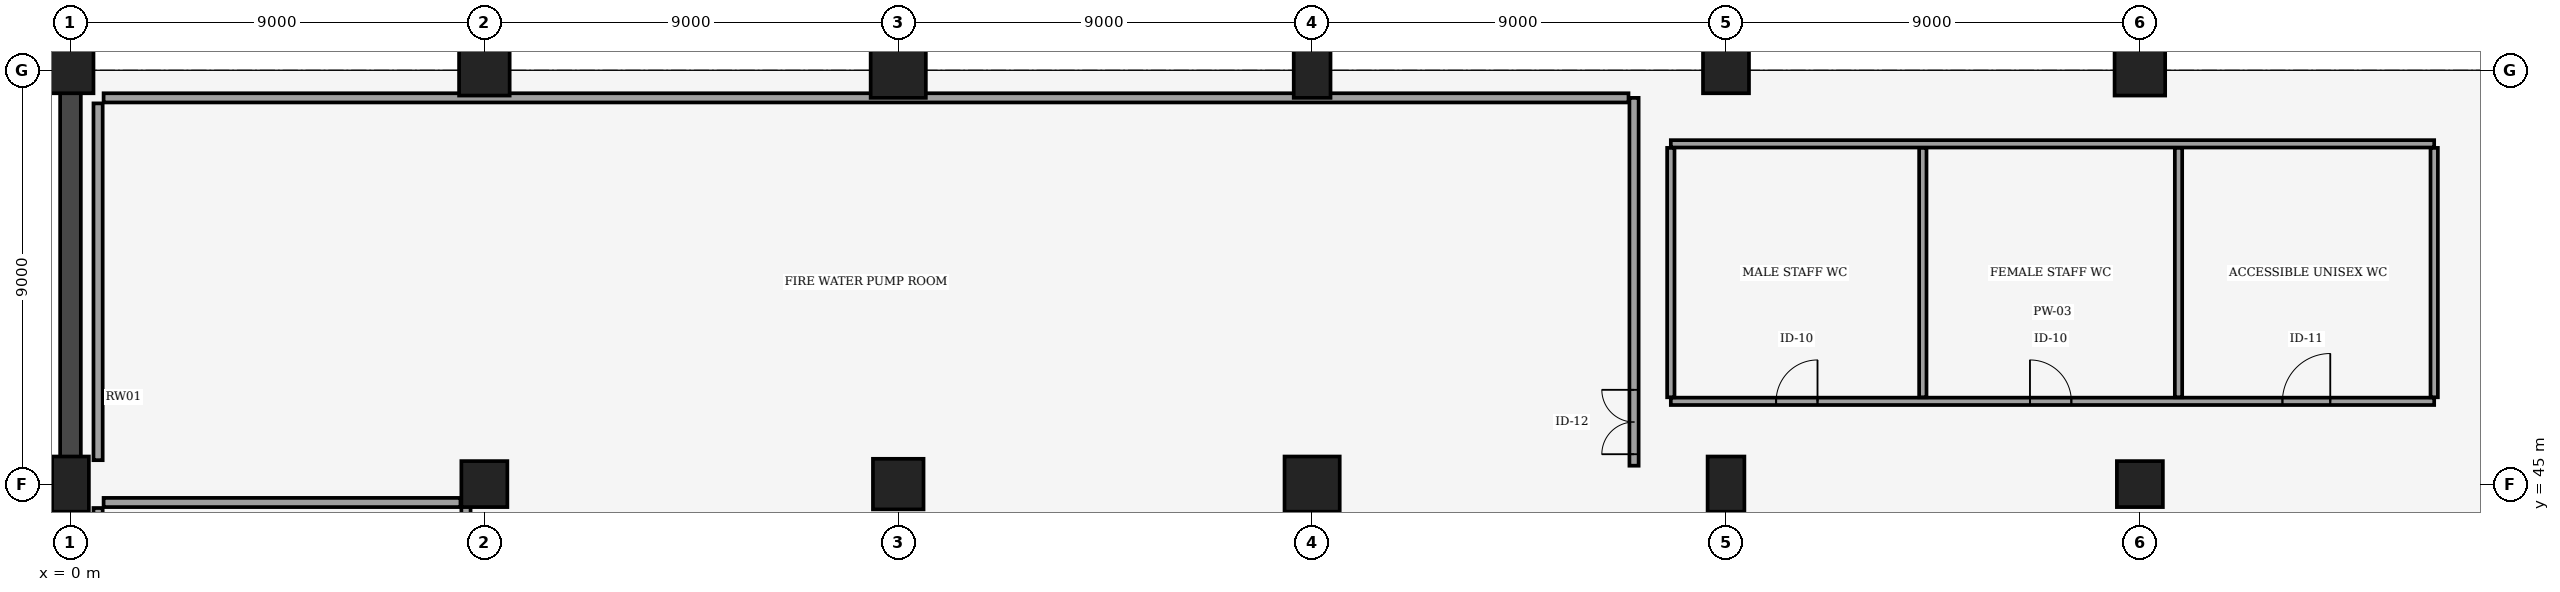
"""IFC4 building model, lengths in metres.
Left out: names, types, materials, properties, quantities, classifications, styles, units other than length and angle.
Written with IfcOpenShell. Run it as: python <this file> out.ifc"""

import sys

from ifc_helpers import new_model, si_unit, direction, frame, frame_2d, origin, origin_2d, place, context, subcontext, project, spatial, rectangle, extrude, element, fill, save


model = new_model("IFC4")
c1 = context("Model", 3, precision=1e-05, world=origin(), true_north=direction((0.0, 1.0)))
c2 = subcontext(c1, "Body", "Model", "MODEL_VIEW")
j1 = project(units=[si_unit("LENGTHUNIT", "METRE"), si_unit("PLANEANGLEUNIT", "RADIAN")], contexts=[c1])
p1 = place(None, origin())
s1 = spatial("IfcSite", under=j1, at=p1, CompositionType="ELEMENT")
p2 = place(p1, origin())
s2 = spatial("IfcBuilding", under=s1, at=p2, CompositionType="ELEMENT")
p3 = place(p2, frame((0.0, 0.0, -5.0)))
s3 = spatial("IfcBuildingStorey", under=s2, at=p3, CompositionType="ELEMENT", Elevation=-5.0)
p4 = place(p3, frame((0.0, 45.0, 0.0), z_axis=(0.0, 0.0, 1.0), x_axis=(1.0, 0.0, 0.0)))
e1 = element("IfcColumn", 1, at=p4, inside=s3, PredefinedType="COLUMN", context=c2, shape_type="SweptSolid", body=[
    extrude(rectangle(XDim=0.8, YDim=1.2, at=origin_2d()), origin(), (0.0, 0.0, 1.0), 5.0),
])
for number, where, z_axis, x_axis in (
    (2, (0.0, 54.0, 0.0), (0.0, 0.0, 1.0), (1.0, 0.0, 0.0)),
    (3, (9.0, 45.0, 0.0), (0.0, 0.0, 1.0), (1.0, 0.0, 0.0)),
):
    element("IfcColumn", number, at=place(p3, frame(where, z_axis=z_axis, x_axis=x_axis)), inside=s3, PredefinedType="COLUMN", context=c2, shape_type="SweptSolid", body=[
        extrude(rectangle(XDim=1.0, YDim=1.0, at=origin_2d()), origin(), (0.0, 0.0, 1.0), 5.0),
    ])
for number, where, z_axis, x_axis in (
    (4, (9.0, 54.0, 0.0), (0.0, 0.0, 1.0), (1.0, 0.0, 0.0)),
    (5, (18.0, 45.0, 0.0), (0.0, 0.0, 1.0), (1.0, 0.0, 0.0)),
):
    element("IfcColumn", number, at=place(p3, frame(where, z_axis=z_axis, x_axis=x_axis)), inside=s3, PredefinedType="COLUMN", context=c2, shape_type="SweptSolid", body=[
        extrude(rectangle(XDim=1.1, YDim=1.1, at=origin_2d()), origin(), (0.0, 0.0, 1.0), 5.0),
    ])
for number, where, z_axis, x_axis in (
    (6, (18.0, 54.0, 0.0), (0.0, 0.0, 1.0), (1.0, 0.0, 0.0)),
    (7, (27.0, 45.0, 0.0), (0.0, 0.0, 1.0), (1.0, 0.0, 0.0)),
):
    element("IfcColumn", number, at=place(p3, frame(where, z_axis=z_axis, x_axis=x_axis)), inside=s3, PredefinedType="COLUMN", context=c2, shape_type="SweptSolid", body=[
        extrude(rectangle(XDim=1.2, YDim=1.2, at=origin_2d()), origin(), (0.0, 0.0, 1.0), 5.0),
    ])
for number, where, z_axis, x_axis in (
    (8, (27.0, 54.0, 0.0), (0.0, 0.0, 1.0), (1.0, 0.0, 0.0)),
    (9, (36.0, 45.0, 0.0), (0.0, 0.0, 1.0), (1.0, 0.0, 0.0)),
):
    element("IfcColumn", number, at=place(p3, frame(where, z_axis=z_axis, x_axis=x_axis)), inside=s3, PredefinedType="COLUMN", context=c2, shape_type="SweptSolid", body=[
        extrude(rectangle(XDim=0.8, YDim=1.2, at=origin_2d()), origin(), (0.0, 0.0, 1.0), 5.0),
    ])
for number, where, z_axis, x_axis in (
    (10, (36.0, 54.0, 0.0), (0.0, 0.0, 1.0), (1.0, 0.0, 0.0)),
    (11, (45.0, 45.0, 0.0), (0.0, 0.0, 1.0), (1.0, 0.0, 0.0)),
):
    element("IfcColumn", number, at=place(p3, frame(where, z_axis=z_axis, x_axis=x_axis)), inside=s3, PredefinedType="COLUMN", context=c2, shape_type="SweptSolid", body=[
        extrude(rectangle(XDim=1.0, YDim=1.0, at=origin_2d()), origin(), (0.0, 0.0, 1.0), 5.0),
    ])
p5 = place(p3, frame((45.0, 54.0, 0.0), z_axis=(0.0, 0.0, 1.0), x_axis=(1.0, 0.0, 0.0)))
e12 = element("IfcColumn", 12, at=p5, inside=s3, PredefinedType="COLUMN", context=c2, shape_type="SweptSolid", body=[
    extrude(rectangle(XDim=1.1, YDim=1.1, at=origin_2d()), origin(), (0.0, 0.0, 1.0), 5.0),
])
p6 = place(p3, frame((0.0, 0.595, 0.0), z_axis=(0.0, 0.0, 1.0), x_axis=(0.0, 1.0, 0.0)))
e13 = element("IfcWall", 13, at=p6, inside=s3, PredefinedType="SHEAR", context=c2, shape_type="SweptSolid", body=[
    extrude(rectangle(XDim=52.91, YDim=0.45, at=frame_2d((26.455, 0.0))), origin(), (0.0, 0.0, 1.0), 3.95),
])
p7 = place(p3, frame((34.8, 46.8, 0.0), z_axis=(0.0, 0.0, 1.0), x_axis=(1.0, 0.0, 0.0)))
e14 = element("IfcWall", 14, at=p7, inside=s3, PredefinedType="PLUMBINGWALL", context=c2, shape_type="SweptSolid", body=[
    extrude(rectangle(XDim=16.6, YDim=0.16, at=frame_2d((8.3, 0.0))), origin(), (0.0, 0.0, 1.0), 3.85),
])
p8 = place(p7, frame((2.29, 0.0, 0.0)))
e15 = element("IfcOpeningElement", 15, at=p8, cuts=e14, PredefinedType="OPENING", context=c2, shape_type="SweptSolid", body=[
    extrude(rectangle(XDim=0.9, YDim=2.1, at=frame_2d((0.45, 1.05))), frame((0.0, 0.09, 0.0), z_axis=(0.0, -1.0, 0.0), x_axis=(1.0, 0.0, 0.0)), (0.0, 0.0, 1.0), 0.18),
])
p9 = place(p7, frame((7.81, 0.0, 0.0)))
e16 = element("IfcOpeningElement", 16, at=p9, cuts=e14, PredefinedType="OPENING", context=c2, shape_type="SweptSolid", body=[
    extrude(rectangle(XDim=0.9, YDim=2.1, at=frame_2d((0.45, 1.05))), frame((0.0, 0.09, 0.0), z_axis=(0.0, -1.0, 0.0), x_axis=(1.0, 0.0, 0.0)), (0.0, 0.0, 1.0), 0.18),
])
p10 = place(p7, frame((13.3, 0.0, 0.0)))
e17 = element("IfcOpeningElement", 17, at=p10, cuts=e14, PredefinedType="OPENING", context=c2, shape_type="SweptSolid", body=[
    extrude(rectangle(XDim=1.04, YDim=2.15, at=frame_2d((0.52, 1.075))), frame((0.0, 0.09, 0.0), z_axis=(0.0, -1.0, 0.0), x_axis=(1.0, 0.0, 0.0)), (0.0, 0.0, 1.0), 0.18),
])
p11 = place(p3, frame((34.8, 52.4, 0.0), z_axis=(0.0, 0.0, 1.0), x_axis=(1.0, 0.0, 0.0)))
e18 = element("IfcWall", 18, at=p11, inside=s3, PredefinedType="PLUMBINGWALL", context=c2, shape_type="SweptSolid", body=[
    extrude(rectangle(XDim=16.6, YDim=0.16, at=frame_2d((8.3, 0.0))), origin(), (0.0, 0.0, 1.0), 3.85),
])
for number, where, z_axis, x_axis in (
    (19, (34.8, 46.888, 0.0), (0.0, 0.0, 1.0), (0.0, 1.0, 0.0)),
    (20, (40.28, 46.888, 0.0), (0.0, 0.0, 1.0), (0.0, 1.0, 0.0)),
    (21, (45.84, 46.888, 0.0), (0.0, 0.0, 1.0), (0.0, 1.0, 0.0)),
    (22, (51.4, 46.888, 0.0), (0.0, 0.0, 1.0), (0.0, 1.0, 0.0)),
):
    element("IfcWall", number, at=place(p3, frame(where, z_axis=z_axis, x_axis=x_axis)), inside=s3, PredefinedType="PLUMBINGWALL", context=c2, shape_type="SweptSolid", body=[
        extrude(rectangle(XDim=5.424, YDim=0.16, at=frame_2d((2.712, 0.0))), origin(), (0.0, 0.0, 1.0), 3.85),
    ])
p12 = place(p3, frame((8.6, 27.14, 0.0), z_axis=(0.0, 0.0, 1.0), x_axis=(0.0, 1.0, 0.0)))
e23 = element("IfcWall", 23, at=p12, inside=s3, PredefinedType="SOLIDWALL", context=c2, shape_type="SweptSolid", body=[
    extrude(rectangle(XDim=17.46, YDim=0.2, at=frame_2d((8.73, 0.0))), origin(), (0.0, 0.0, 1.0), 3.85),
])
p13 = place(p12, frame((1.15, 0.0, 0.0)))
e24 = element("IfcOpeningElement", 24, at=p13, cuts=e23, PredefinedType="OPENING", context=c2, shape_type="SweptSolid", body=[
    extrude(rectangle(XDim=1.05, YDim=2.15, at=frame_2d((0.525, 1.075))), frame((0.0, 0.11, 0.0), z_axis=(0.0, -1.0, 0.0), x_axis=(1.0, 0.0, 0.0)), (0.0, 0.0, 1.0), 0.22),
])
p14 = place(p3, frame((0.72, 44.6, 0.0), z_axis=(0.0, 0.0, 1.0), x_axis=(1.0, 0.0, 0.0)))
e25 = element("IfcWall", 25, at=p14, inside=s3, PredefinedType="SOLIDWALL", context=c2, shape_type="SweptSolid", body=[
    extrude(rectangle(XDim=7.76, YDim=0.2, at=frame_2d((3.88, 0.0))), origin(), (0.0, 0.0, 1.0), 3.85),
])
p15 = place(p3, frame((0.6, 27.26, 0.0), z_axis=(0.0, 0.0, 1.0), x_axis=(0.0, 1.0, 0.0)))
e26 = element("IfcWall", 26, at=p15, inside=s3, PredefinedType="SOLIDWALL", context=c2, shape_type="SweptSolid", body=[
    extrude(rectangle(XDim=17.22, YDim=0.2, at=frame_2d((8.61, 0.0))), origin(), (0.0, 0.0, 1.0), 3.85),
])
p16 = place(p3, frame((34.0, 45.4, 0.0), z_axis=(0.0, 0.0, 1.0), x_axis=(0.0, 1.0, 0.0)))
e27 = element("IfcWall", 27, at=p16, inside=s3, PredefinedType="SOLIDWALL", context=c2, shape_type="SweptSolid", body=[
    extrude(rectangle(XDim=8.0, YDim=0.2, at=frame_2d((4.0, 0.0))), origin(), (0.0, 0.0, 1.0), 3.85),
])
p17 = place(p16, frame((0.25, 0.0, 0.0)))
e28 = element("IfcOpeningElement", 28, at=p17, cuts=e27, PredefinedType="OPENING", context=c2, shape_type="SweptSolid", body=[
    extrude(rectangle(XDim=1.4, YDim=2.25, at=frame_2d((0.7, 1.125))), frame((0.0, 0.11, 0.0), z_axis=(0.0, -1.0, 0.0), x_axis=(1.0, 0.0, 0.0)), (0.0, 0.0, 1.0), 0.22),
])
p18 = place(p3, frame((0.72, 53.4, 0.0), z_axis=(0.0, 0.0, 1.0), x_axis=(1.0, 0.0, 0.0)))
e29 = element("IfcWall", 29, at=p18, inside=s3, PredefinedType="SOLIDWALL", context=c2, shape_type="SweptSolid", body=[
    extrude(rectangle(XDim=33.16, YDim=0.2, at=frame_2d((16.58, 0.0))), origin(), (0.0, 0.0, 1.0), 3.85),
])
p19 = place(p3, frame((0.6, 45.52, 0.0), z_axis=(0.0, 0.0, 1.0), x_axis=(0.0, 1.0, 0.0)))
e30 = element("IfcWall", 30, at=p19, inside=s3, PredefinedType="SOLIDWALL", context=c2, shape_type="SweptSolid", body=[
    extrude(rectangle(XDim=7.76, YDim=0.2, at=frame_2d((3.88, 0.0))), origin(), (0.0, 0.0, 1.0), 3.85),
])
p20 = place(p8, origin())
e31 = element("IfcDoor", 31, at=p20, inside=s3, OperationType="SINGLE_SWING_RIGHT", PredefinedType="DOOR", context=c2, shape_type="SweptSolid", body=[
    extrude(rectangle(XDim=0.9, YDim=2.1, at=frame_2d((0.45, 1.05))), frame((0.0, 0.025, 0.0), z_axis=(0.0, -1.0, 0.0), x_axis=(1.0, 0.0, 0.0)), (0.0, 0.0, 1.0), 0.05),
])
fill(e15, e31)
p21 = place(p9, origin())
e32 = element("IfcDoor", 32, at=p21, inside=s3, OperationType="SINGLE_SWING_LEFT", PredefinedType="DOOR", context=c2, shape_type="SweptSolid", body=[
    extrude(rectangle(XDim=0.9, YDim=2.1, at=frame_2d((0.45, 1.05))), frame((0.0, 0.025, 0.0), z_axis=(0.0, -1.0, 0.0), x_axis=(1.0, 0.0, 0.0)), (0.0, 0.0, 1.0), 0.05),
])
fill(e16, e32)
p22 = place(p10, origin())
e33 = element("IfcDoor", 33, at=p22, inside=s3, OperationType="SINGLE_SWING_RIGHT", PredefinedType="DOOR", context=c2, shape_type="SweptSolid", body=[
    extrude(rectangle(XDim=1.04, YDim=2.15, at=frame_2d((0.52, 1.075))), frame((0.0, 0.025, 0.0), z_axis=(0.0, -1.0, 0.0), x_axis=(1.0, 0.0, 0.0)), (0.0, 0.0, 1.0), 0.05),
])
fill(e17, e33)
p23 = place(p17, origin())
e34 = element("IfcDoor", 34, at=p23, inside=s3, OperationType="DOUBLE_DOOR_SINGLE_SWING", PredefinedType="DOOR", context=c2, shape_type="SweptSolid", body=[
    extrude(rectangle(XDim=1.4, YDim=2.25, at=frame_2d((0.7, 1.125))), frame((0.0, 0.025, 0.0), z_axis=(0.0, -1.0, 0.0), x_axis=(1.0, 0.0, 0.0)), (0.0, 0.0, 1.0), 0.05),
])
fill(e28, e34)
save(model, sys.argv[1])
